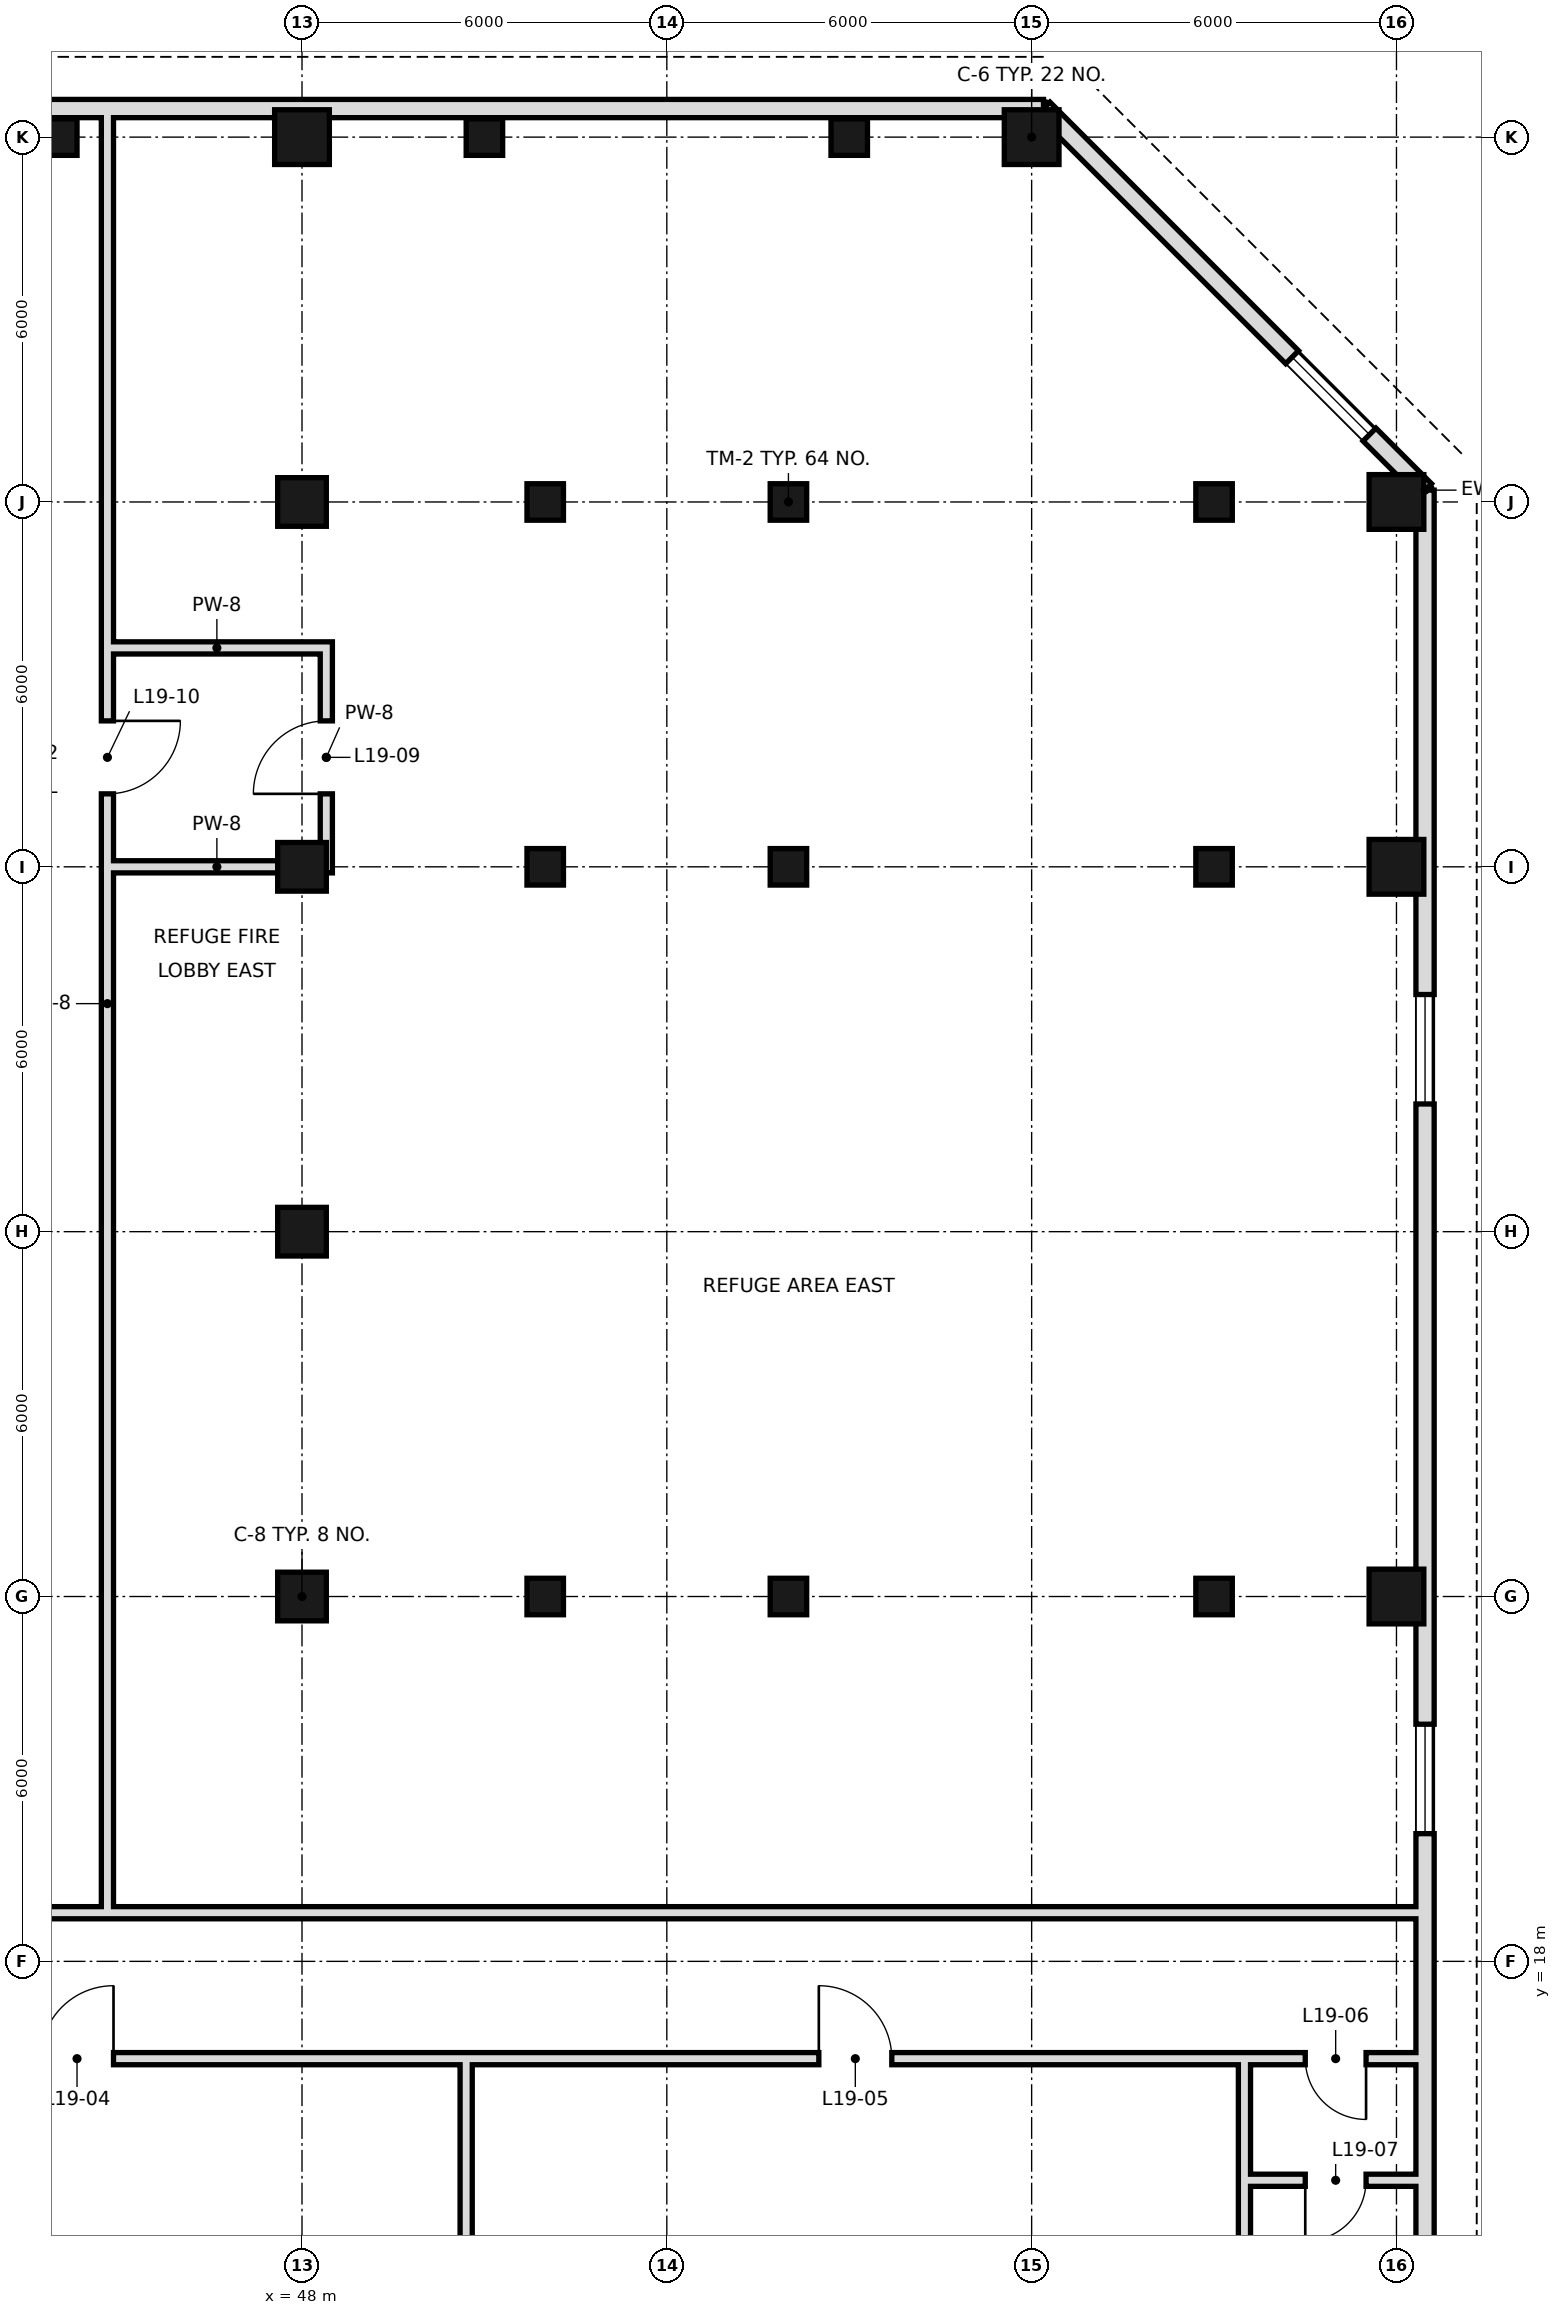
"""IFC4 building model, lengths in metres.
Left out: names, types, materials, properties, quantities, classifications, styles, units other than length and angle.
Written with IfcOpenShell. Run it as: python <this file> out.ifc"""

import sys

from ifc_helpers import new_model, si_unit, direction, frame, frame_2d, origin, origin_2d, place, context, subcontext, project, spatial, rectangle, hollow_rectangle, extrude, element, fill, save


model = new_model("IFC4")
c1 = context("Model", 3, precision=1e-05, world=origin(), true_north=direction((0.0, 1.0)))
c2 = subcontext(c1, "Body", "Model", "MODEL_VIEW")
j1 = project(units=[si_unit("LENGTHUNIT", "METRE"), si_unit("PLANEANGLEUNIT", "RADIAN")], contexts=[c1])
p1 = place(None, origin())
s1 = spatial("IfcSite", under=j1, at=p1, CompositionType="ELEMENT")
p2 = place(p1, origin())
s2 = spatial("IfcBuilding", under=s1, at=p2, CompositionType="ELEMENT")
p3 = place(p2, frame((0.0, 0.0, 90.2)))
s3 = spatial("IfcBuildingStorey", under=s2, at=p3, CompositionType="ELEMENT", Elevation=90.2)
for number, where, z_axis, x_axis in (
    (1, (48.0, 24.0, 0.0), (0.0, 0.0, 1.0), (1.0, 0.0, 0.0)),
    (2, (48.0, 30.0, 0.0), (0.0, 0.0, 1.0), (1.0, 0.0, 0.0)),
    (3, (48.0, 36.0, 0.0), (0.0, 0.0, 1.0), (1.0, 0.0, 0.0)),
    (4, (48.0, 42.0, 0.0), (0.0, 0.0, 1.0), (1.0, 0.0, 0.0)),
):
    element("IfcColumn", number, at=place(p3, frame(where, z_axis=z_axis, x_axis=x_axis)), inside=s3, PredefinedType="COLUMN", context=c2, shape_type="SweptSolid", body=[
        extrude(hollow_rectangle(XDim=0.8, YDim=0.8, WallThickness=0.04, at=origin_2d()), origin(), (0.0, 0.0, 1.0), 6.0),
    ])
for number, where, z_axis, x_axis in (
    (5, (48.0, 48.0, 0.0), (0.0, 0.0, 1.0), (1.0, 0.0, 0.0)),
    (6, (60.0, 48.0, 0.0), (0.0, 0.0, 1.0), (1.0, 0.0, 0.0)),
    (7, (66.0, 24.0, 0.0), (0.0, 0.0, 1.0), (1.0, 0.0, 0.0)),
    (8, (66.0, 36.0, 0.0), (0.0, 0.0, 1.0), (1.0, 0.0, 0.0)),
    (9, (66.0, 42.0, 0.0), (0.0, 0.0, 1.0), (1.0, 0.0, 0.0)),
):
    element("IfcColumn", number, at=place(p3, frame(where, z_axis=z_axis, x_axis=x_axis)), inside=s3, PredefinedType="COLUMN", context=c2, shape_type="SweptSolid", body=[
        extrude(hollow_rectangle(XDim=0.9, YDim=0.9, WallThickness=0.045, at=origin_2d()), origin(), (0.0, 0.0, 1.0), 6.0),
    ])
for number, where, z_axis, x_axis in (
    (10, (52.0, 24.0, 1.2), (0.0, 0.0, 1.0), (1.0, 0.0, 0.0)),
    (11, (56.0, 24.0, 1.2), (0.0, 0.0, 1.0), (1.0, 0.0, 0.0)),
    (12, (63.0, 24.0, 1.2), (0.0, 0.0, 1.0), (1.0, 0.0, 0.0)),
    (13, (52.0, 36.0, 1.2), (0.0, 0.0, 1.0), (1.0, 0.0, 0.0)),
    (14, (56.0, 36.0, 1.2), (0.0, 0.0, 1.0), (1.0, 0.0, 0.0)),
    (15, (63.0, 36.0, 1.2), (0.0, 0.0, 1.0), (1.0, 0.0, 0.0)),
    (16, (52.0, 42.0, 1.2), (0.0, 0.0, 1.0), (1.0, 0.0, 0.0)),
    (17, (56.0, 42.0, 1.2), (0.0, 0.0, 1.0), (1.0, 0.0, 0.0)),
    (18, (63.0, 42.0, 1.2), (0.0, 0.0, 1.0), (1.0, 0.0, 0.0)),
    (19, (44.0, 48.0, 1.2), (0.0, 0.0, 1.0), (1.0, 0.0, 0.0)),
    (20, (51.0, 48.0, 1.2), (0.0, 0.0, 1.0), (1.0, 0.0, 0.0)),
    (21, (57.0, 48.0, 1.2), (0.0, 0.0, 1.0), (1.0, 0.0, 0.0)),
):
    element("IfcColumn", number, at=place(p3, frame(where, z_axis=z_axis, x_axis=x_axis)), inside=s3, PredefinedType="COLUMN", context=c2, shape_type="SweptSolid", body=[
        extrude(hollow_rectangle(XDim=0.6, YDim=0.6, WallThickness=0.04, at=origin_2d()), origin(), (0.0, 0.0, 1.0), 3.3),
    ])
p4 = place(p3, frame((66.47, 5.805, 0.0), z_axis=(0.0, 0.0, 1.0), x_axis=(0.0, 1.0, 0.0)))
e22 = element("IfcWall", 22, at=p4, inside=s3, PredefinedType="SOLIDWALL", context=c2, shape_type="SweptSolid", body=[
    extrude(rectangle(XDim=36.389, YDim=0.3, at=frame_2d((18.195, 0.0))), origin(), (0.0, 0.0, 1.0), 5.7),
])
p5 = place(p4, frame((2.17, 0.0, 0.9)))
e23 = element("IfcOpeningElement", 23, at=p5, cuts=e22, PredefinedType="OPENING", context=c2, shape_type="SweptSolid", body=[
    extrude(rectangle(XDim=1.8, YDim=1.5, at=frame_2d((0.9, 0.75))), frame((0.0, 0.16, 0.0), z_axis=(0.0, -1.0, 0.0), x_axis=(1.0, 0.0, 0.0)), (0.0, 0.0, 1.0), 0.32),
])
p6 = place(p4, frame((14.295, 0.0, 0.9)))
e24 = element("IfcOpeningElement", 24, at=p6, cuts=e22, PredefinedType="OPENING", context=c2, shape_type="SweptSolid", body=[
    extrude(rectangle(XDim=1.8, YDim=1.5, at=frame_2d((0.9, 0.75))), frame((0.0, 0.16, 0.0), z_axis=(0.0, -1.0, 0.0), x_axis=(1.0, 0.0, 0.0)), (0.0, 0.0, 1.0), 0.32),
])
p7 = place(p4, frame((26.295, 0.0, 0.9)))
e25 = element("IfcOpeningElement", 25, at=p7, cuts=e22, PredefinedType="OPENING", context=c2, shape_type="SweptSolid", body=[
    extrude(rectangle(XDim=1.8, YDim=1.5, at=frame_2d((0.9, 0.75))), frame((0.0, 0.16, 0.0), z_axis=(0.0, -1.0, 0.0), x_axis=(1.0, 0.0, 0.0)), (0.0, 0.0, 1.0), 0.32),
])
p8 = place(p3, frame((66.47, 42.195, 0.0), z_axis=(0.0, 0.0, 1.0), x_axis=(-0.707106781187, 0.707106781187, 0.0)))
e26 = element("IfcWall", 26, at=p8, inside=s3, PredefinedType="SOLIDWALL", context=c2, shape_type="SweptSolid", body=[
    extrude(rectangle(XDim=8.875, YDim=0.3, at=frame_2d((4.438, 0.0))), origin(), (0.0, 0.0, 1.0), 5.7),
])
p9 = place(p8, frame((1.292, 0.0, 0.9)))
e27 = element("IfcOpeningElement", 27, at=p9, cuts=e26, PredefinedType="OPENING", context=c2, shape_type="SweptSolid", body=[
    extrude(rectangle(XDim=1.8, YDim=1.5, at=frame_2d((0.9, 0.75))), frame((0.0, 0.16, 0.0), z_axis=(0.0, -1.0, 0.0), x_axis=(1.0, 0.0, 0.0)), (0.0, 0.0, 1.0), 0.32),
])
p10 = place(p3, frame((60.195, 48.47, 0.0), z_axis=(0.0, 0.0, 1.0), x_axis=(-1.0, 0.0, 0.0)))
e28 = element("IfcWall", 28, at=p10, inside=s3, PredefinedType="SOLIDWALL", context=c2, shape_type="SweptSolid", body=[
    extrude(rectangle(XDim=54.389, YDim=0.3, at=frame_2d((27.195, 0.0))), origin(), (0.0, 0.0, 1.0), 5.7),
])
p11 = place(p3, frame((44.8, 18.9, 0.0), z_axis=(0.0, 0.0, 1.0), x_axis=(0.0, 1.0, 0.0)))
e29 = element("IfcWall", 29, at=p11, inside=s3, PredefinedType="SOLIDWALL", context=c2, shape_type="SweptSolid", body=[
    extrude(rectangle(XDim=29.7, YDim=0.2, at=frame_2d((14.85, 0.0))), origin(), (0.0, 0.0, 1.0), 5.25),
])
p12 = place(p11, frame((18.3, 0.0, 0.0)))
e30 = element("IfcOpeningElement", 30, at=p12, cuts=e29, PredefinedType="OPENING", context=c2, shape_type="SweptSolid", body=[
    extrude(rectangle(XDim=1.2, YDim=2.4, at=frame_2d((0.6, 1.2))), frame((0.0, 0.11, 0.0), z_axis=(0.0, -1.0, 0.0), x_axis=(1.0, 0.0, 0.0)), (0.0, 0.0, 1.0), 0.22),
])
p13 = place(p3, frame((48.4, 35.9, 0.0), z_axis=(0.0, 0.0, 1.0), x_axis=(0.0, 1.0, 0.0)))
e31 = element("IfcWall", 31, at=p13, inside=s3, PredefinedType="SOLIDWALL", context=c2, shape_type="SweptSolid", body=[
    extrude(rectangle(XDim=3.8, YDim=0.2, at=frame_2d((1.9, 0.0))), origin(), (0.0, 0.0, 1.0), 5.7),
])
p14 = place(p13, frame((1.3, 0.0, 0.0)))
e32 = element("IfcOpeningElement", 32, at=p14, cuts=e31, PredefinedType="OPENING", context=c2, shape_type="SweptSolid", body=[
    extrude(rectangle(XDim=1.2, YDim=2.4, at=frame_2d((0.6, 1.2))), frame((0.0, 0.11, 0.0), z_axis=(0.0, -1.0, 0.0), x_axis=(1.0, 0.0, 0.0)), (0.0, 0.0, 1.0), 0.22),
])
p15 = place(p3, frame((50.7, -0.6, 0.0), z_axis=(0.0, 0.0, 1.0), x_axis=(0.0, 1.0, 0.0)))
e33 = element("IfcWall", 33, at=p15, inside=s3, PredefinedType="SOLIDWALL", context=c2, shape_type="SweptSolid", body=[
    extrude(rectangle(XDim=16.9, YDim=0.2, at=frame_2d((8.45, 0.0))), origin(), (0.0, 0.0, 1.0), 5.7),
])
p16 = place(p3, frame((63.5, 2.651, 0.0), z_axis=(0.0, 0.0, 1.0), x_axis=(0.0, 1.0, 0.0)))
e34 = element("IfcWall", 34, at=p16, inside=s3, PredefinedType="SOLIDWALL", context=c2, shape_type="SweptSolid", body=[
    extrude(rectangle(XDim=13.649, YDim=0.2, at=frame_2d((6.825, 0.0))), origin(), (0.0, 0.0, 1.0), 5.7),
])
p17 = place(p3, frame((63.6, 14.4, 0.0), z_axis=(0.0, 0.0, 1.0), x_axis=(1.0, 0.0, 0.0)))
e35 = element("IfcWall", 35, at=p17, inside=s3, PredefinedType="SOLIDWALL", context=c2, shape_type="SweptSolid", body=[
    extrude(rectangle(XDim=3.0, YDim=0.2, at=frame_2d((1.5, 0.0))), origin(), (0.0, 0.0, 1.0), 5.7),
])
p18 = place(p17, frame((0.9, 0.0, 0.0)))
e36 = element("IfcOpeningElement", 36, at=p18, cuts=e35, PredefinedType="OPENING", context=c2, shape_type="SweptSolid", body=[
    extrude(rectangle(XDim=1.0, YDim=2.4, at=frame_2d((0.5, 1.2))), frame((0.0, 0.11, 0.0), z_axis=(0.0, -1.0, 0.0), x_axis=(1.0, 0.0, 0.0)), (0.0, 0.0, 1.0), 0.22),
])
p19 = place(p3, frame((-0.6, 16.4, 0.0), z_axis=(0.0, 0.0, 1.0), x_axis=(1.0, 0.0, 0.0)))
e37 = element("IfcWall", 37, at=p19, inside=s3, PredefinedType="SOLIDWALL", context=c2, shape_type="SweptSolid", body=[
    extrude(rectangle(XDim=67.2, YDim=0.2, at=frame_2d((33.6, 0.0))), origin(), (0.0, 0.0, 1.0), 5.0),
])
p20 = place(p19, frame((6.0, 0.0, 0.0)))
e38 = element("IfcOpeningElement", 38, at=p20, cuts=e37, PredefinedType="OPENING", context=c2, shape_type="SweptSolid", body=[
    extrude(rectangle(XDim=1.0, YDim=2.4, at=frame_2d((0.5, 1.2))), frame((0.0, 0.11, 0.0), z_axis=(0.0, -1.0, 0.0), x_axis=(1.0, 0.0, 0.0)), (0.0, 0.0, 1.0), 0.22),
])
p21 = place(p19, frame((18.7, 0.0, 0.0)))
e39 = element("IfcOpeningElement", 39, at=p21, cuts=e37, PredefinedType="OPENING", context=c2, shape_type="SweptSolid", body=[
    extrude(rectangle(XDim=1.2, YDim=2.4, at=frame_2d((0.6, 1.2))), frame((0.0, 0.11, 0.0), z_axis=(0.0, -1.0, 0.0), x_axis=(1.0, 0.0, 0.0)), (0.0, 0.0, 1.0), 0.22),
])
p22 = place(p19, frame((31.5, 0.0, 0.0)))
e40 = element("IfcOpeningElement", 40, at=p22, cuts=e37, PredefinedType="OPENING", context=c2, shape_type="SweptSolid", body=[
    extrude(rectangle(XDim=1.2, YDim=2.4, at=frame_2d((0.6, 1.2))), frame((0.0, 0.11, 0.0), z_axis=(0.0, -1.0, 0.0), x_axis=(1.0, 0.0, 0.0)), (0.0, 0.0, 1.0), 0.22),
])
p23 = place(p19, frame((44.3, 0.0, 0.0)))
e41 = element("IfcOpeningElement", 41, at=p23, cuts=e37, PredefinedType="OPENING", context=c2, shape_type="SweptSolid", body=[
    extrude(rectangle(XDim=1.2, YDim=2.4, at=frame_2d((0.6, 1.2))), frame((0.0, 0.11, 0.0), z_axis=(0.0, -1.0, 0.0), x_axis=(1.0, 0.0, 0.0)), (0.0, 0.0, 1.0), 0.22),
])
p24 = place(p19, frame((57.1, 0.0, 0.0)))
e42 = element("IfcOpeningElement", 42, at=p24, cuts=e37, PredefinedType="OPENING", context=c2, shape_type="SweptSolid", body=[
    extrude(rectangle(XDim=1.2, YDim=2.4, at=frame_2d((0.6, 1.2))), frame((0.0, 0.11, 0.0), z_axis=(0.0, -1.0, 0.0), x_axis=(1.0, 0.0, 0.0)), (0.0, 0.0, 1.0), 0.22),
])
p25 = place(p19, frame((65.1, 0.0, 0.0)))
e43 = element("IfcOpeningElement", 43, at=p25, cuts=e37, PredefinedType="OPENING", context=c2, shape_type="SweptSolid", body=[
    extrude(rectangle(XDim=1.0, YDim=2.4, at=frame_2d((0.5, 1.2))), frame((0.0, 0.11, 0.0), z_axis=(0.0, -1.0, 0.0), x_axis=(1.0, 0.0, 0.0)), (0.0, 0.0, 1.0), 0.22),
])
p26 = place(p3, frame((-0.6, 18.8, 0.0), z_axis=(0.0, 0.0, 1.0), x_axis=(1.0, 0.0, 0.0)))
e44 = element("IfcWall", 44, at=p26, inside=s3, PredefinedType="SOLIDWALL", context=c2, shape_type="SweptSolid", body=[
    extrude(rectangle(XDim=67.2, YDim=0.2, at=frame_2d((33.6, 0.0))), origin(), (0.0, 0.0, 1.0), 5.0),
])
p27 = place(p26, frame((11.2, 0.0, 0.0)))
e45 = element("IfcOpeningElement", 45, at=p27, cuts=e44, PredefinedType="OPENING", context=c2, shape_type="SweptSolid", body=[
    extrude(rectangle(XDim=1.2, YDim=2.4, at=frame_2d((0.6, 1.2))), frame((0.0, 0.11, 0.0), z_axis=(0.0, -1.0, 0.0), x_axis=(1.0, 0.0, 0.0)), (0.0, 0.0, 1.0), 0.22),
])
p28 = place(p3, frame((44.9, 36.0, 0.0), z_axis=(0.0, 0.0, 1.0), x_axis=(1.0, 0.0, 0.0)))
e46 = element("IfcWall", 46, at=p28, inside=s3, PredefinedType="SOLIDWALL", context=c2, shape_type="SweptSolid", body=[
    extrude(rectangle(XDim=3.4, YDim=0.2, at=frame_2d((1.7, 0.0))), origin(), (0.0, 0.0, 1.0), 5.7),
])
p29 = place(p3, frame((44.9, 39.6, 0.0), z_axis=(0.0, 0.0, 1.0), x_axis=(1.0, 0.0, 0.0)))
e47 = element("IfcWall", 47, at=p29, inside=s3, PredefinedType="SOLIDWALL", context=c2, shape_type="SweptSolid", body=[
    extrude(rectangle(XDim=3.4, YDim=0.2, at=frame_2d((1.7, 0.0))), origin(), (0.0, 0.0, 1.0), 5.25),
])
p30 = place(p6, origin())
e48 = element("IfcWindow", 48, at=p30, inside=s3, PartitioningType="SINGLE_PANEL", PredefinedType="WINDOW", context=c2, shape_type="SweptSolid", body=[
    extrude(rectangle(XDim=1.8, YDim=1.5, at=frame_2d((0.9, 0.75))), frame((0.0, 0.03, 0.0), z_axis=(0.0, -1.0, 0.0), x_axis=(1.0, 0.0, 0.0)), (0.0, 0.0, 1.0), 0.06),
])
fill(e24, e48)
p31 = place(p7, origin())
e49 = element("IfcWindow", 49, at=p31, inside=s3, PartitioningType="SINGLE_PANEL", PredefinedType="WINDOW", context=c2, shape_type="SweptSolid", body=[
    extrude(rectangle(XDim=1.8, YDim=1.5, at=frame_2d((0.9, 0.75))), frame((0.0, 0.03, 0.0), z_axis=(0.0, -1.0, 0.0), x_axis=(1.0, 0.0, 0.0)), (0.0, 0.0, 1.0), 0.06),
])
fill(e25, e49)
p32 = place(p9, origin())
e50 = element("IfcWindow", 50, at=p32, inside=s3, PartitioningType="SINGLE_PANEL", PredefinedType="WINDOW", context=c2, shape_type="SweptSolid", body=[
    extrude(rectangle(XDim=1.8, YDim=1.5, at=frame_2d((0.9, 0.75))), frame((0.0, 0.03, 0.0), z_axis=(0.0, -1.0, 0.0), x_axis=(1.0, 0.0, 0.0)), (0.0, 0.0, 1.0), 0.06),
])
fill(e27, e50)
p33 = place(p23, frame((1.2, 0.0, 0.0), z_axis=(0.0, 0.0, 1.0), x_axis=(-1.0, 0.0, 0.0)))
e51 = element("IfcDoor", 51, at=p33, inside=s3, OperationType="SINGLE_SWING_LEFT", PredefinedType="DOOR", context=c2, shape_type="SweptSolid", body=[
    extrude(rectangle(XDim=1.2, YDim=2.4, at=frame_2d((0.6, 1.2))), frame((0.0, 0.025, 0.0), z_axis=(0.0, -1.0, 0.0), x_axis=(1.0, 0.0, 0.0)), (0.0, 0.0, 1.0), 0.05),
])
fill(e41, e51)
p34 = place(p24, origin())
e52 = element("IfcDoor", 52, at=p34, inside=s3, OperationType="SINGLE_SWING_LEFT", PredefinedType="DOOR", context=c2, shape_type="SweptSolid", body=[
    extrude(rectangle(XDim=1.2, YDim=2.4, at=frame_2d((0.6, 1.2))), frame((0.0, 0.025, 0.0), z_axis=(0.0, -1.0, 0.0), x_axis=(1.0, 0.0, 0.0)), (0.0, 0.0, 1.0), 0.05),
])
fill(e42, e52)
p35 = place(p25, origin())
e53 = element("IfcDoor", 53, at=p35, inside=s3, OperationType="SINGLE_SWING_RIGHT", PredefinedType="DOOR", context=c2, shape_type="SweptSolid", body=[
    extrude(rectangle(XDim=1.0, YDim=2.4, at=frame_2d((0.5, 1.2))), frame((0.0, 0.025, 0.0), z_axis=(0.0, -1.0, 0.0), x_axis=(1.0, 0.0, 0.0)), (0.0, 0.0, 1.0), 0.05),
])
fill(e43, e53)
p36 = place(p18, frame((1.0, 0.0, 0.0), z_axis=(0.0, 0.0, 1.0), x_axis=(-1.0, 0.0, 0.0)))
e54 = element("IfcDoor", 54, at=p36, inside=s3, OperationType="SINGLE_SWING_RIGHT", PredefinedType="DOOR", context=c2, shape_type="SweptSolid", body=[
    extrude(rectangle(XDim=1.0, YDim=2.4, at=frame_2d((0.5, 1.2))), frame((0.0, 0.025, 0.0), z_axis=(0.0, -1.0, 0.0), x_axis=(1.0, 0.0, 0.0)), (0.0, 0.0, 1.0), 0.05),
])
fill(e36, e54)
p37 = place(p14, origin())
e55 = element("IfcDoor", 55, at=p37, inside=s3, OperationType="SINGLE_SWING_LEFT", PredefinedType="DOOR", context=c2, shape_type="SweptSolid", body=[
    extrude(rectangle(XDim=1.2, YDim=2.4, at=frame_2d((0.6, 1.2))), frame((0.0, 0.025, 0.0), z_axis=(0.0, -1.0, 0.0), x_axis=(1.0, 0.0, 0.0)), (0.0, 0.0, 1.0), 0.05),
])
fill(e32, e55)
p38 = place(p12, origin())
e56 = element("IfcDoor", 56, at=p38, inside=s3, OperationType="SINGLE_SWING_RIGHT", PredefinedType="DOOR", context=c2, shape_type="SweptSolid", body=[
    extrude(rectangle(XDim=1.2, YDim=2.4, at=frame_2d((0.6, 1.2))), frame((0.0, 0.025, 0.0), z_axis=(0.0, -1.0, 0.0), x_axis=(1.0, 0.0, 0.0)), (0.0, 0.0, 1.0), 0.05),
])
fill(e30, e56)
save(model, sys.argv[1])
